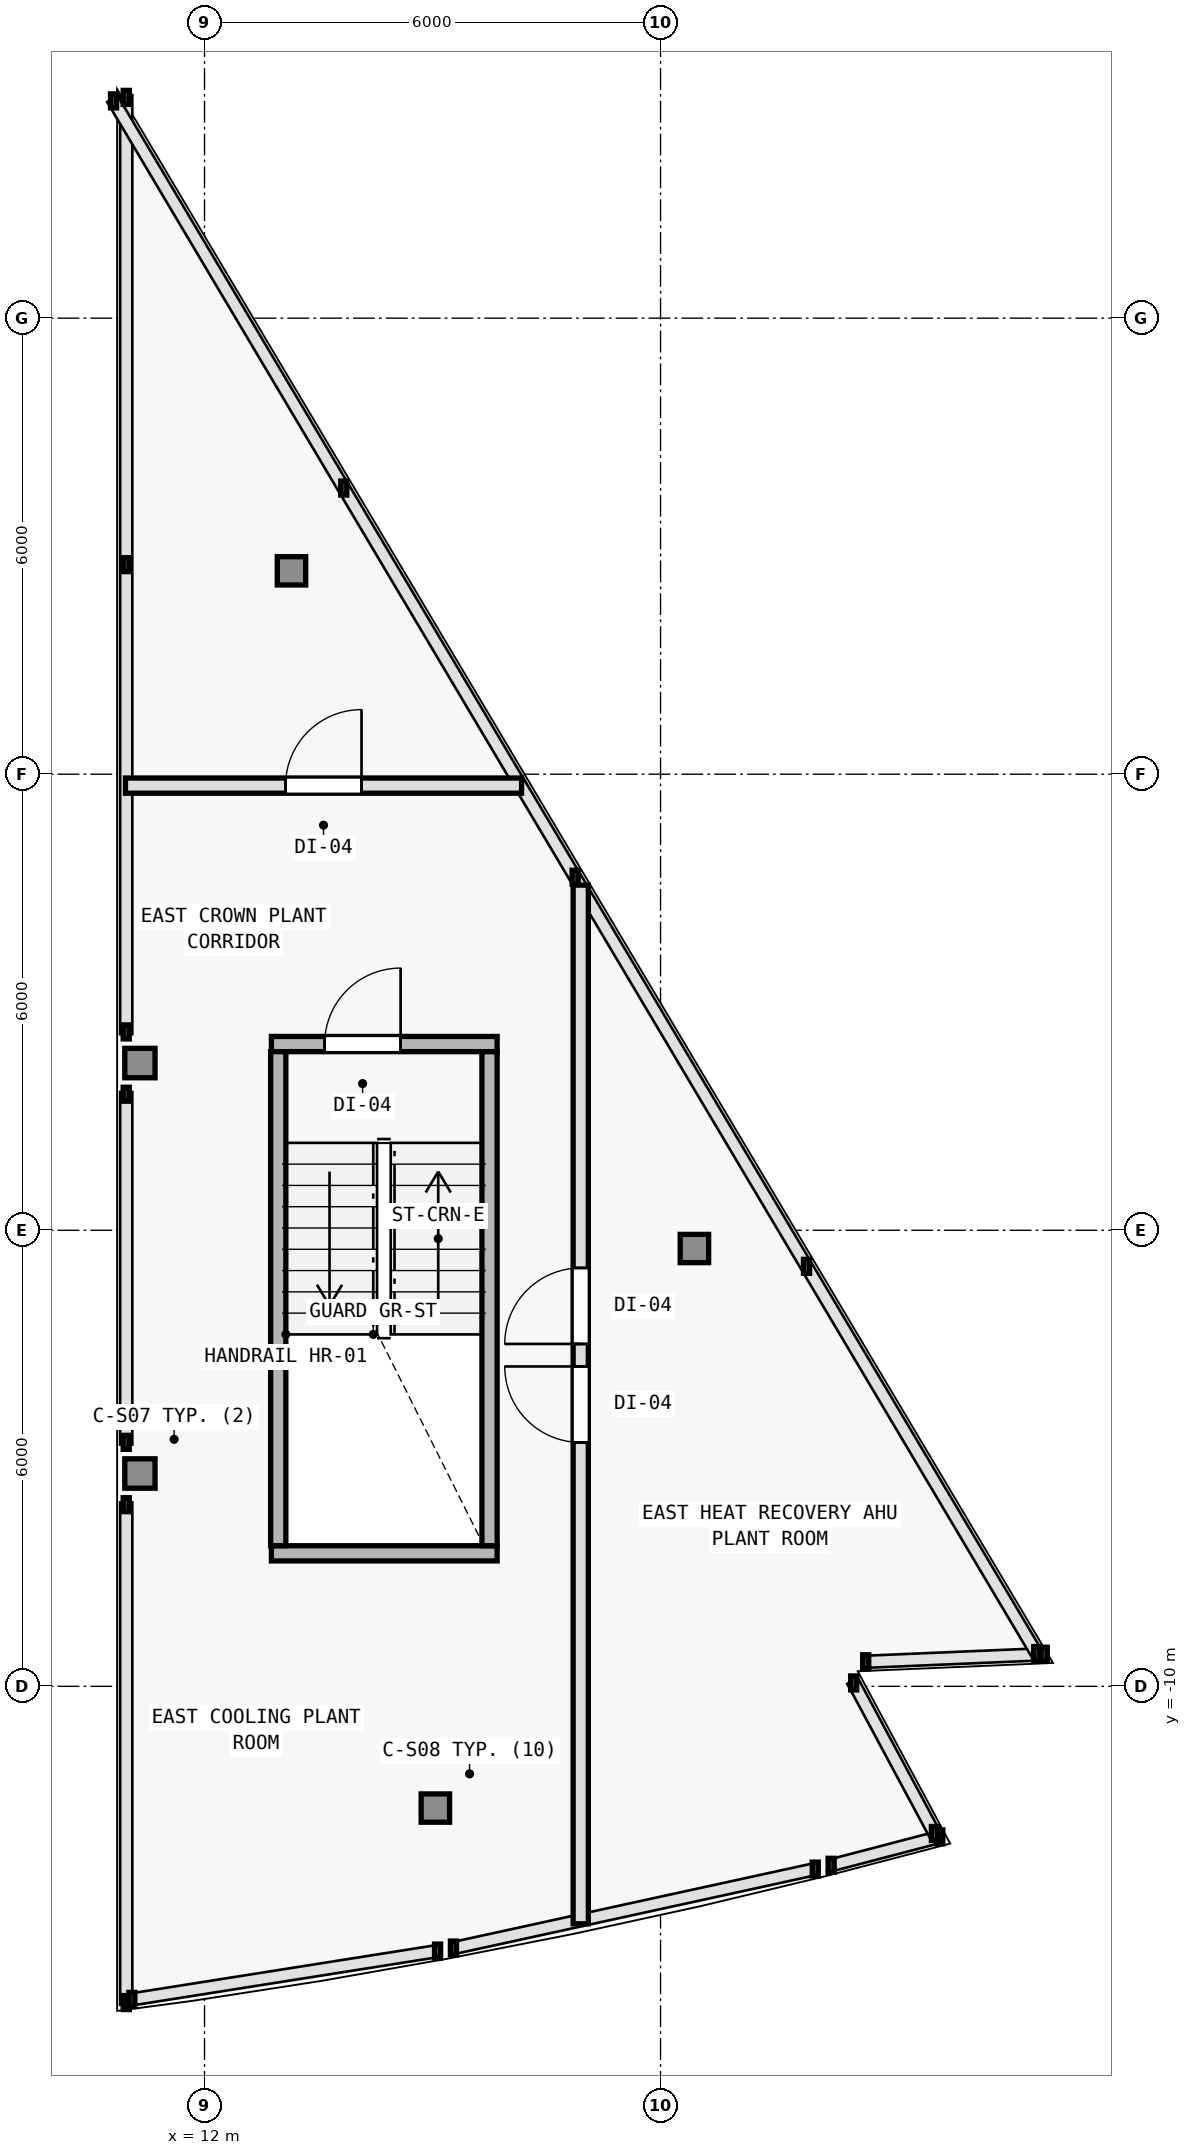
"""IFC4 building model, lengths in metres.
Left out: names, types, materials, properties, quantities, classifications, styles, units other than length and angle.
Written with IfcOpenShell. Run it as: python <this file> out.ifc"""

import sys

from ifc_helpers import new_model, si_unit, direction, frame, frame_2d, origin, origin_2d, place, context, subcontext, project, spatial, rectangle, i_section, extrude, element, fill, save


model = new_model("IFC4")
c1 = context("Model", 3, precision=1e-05, world=origin(), true_north=direction((0.0, 1.0)))
c2 = subcontext(c1, "Body", "Model", "MODEL_VIEW")
j1 = project(units=[si_unit("LENGTHUNIT", "METRE"), si_unit("PLANEANGLEUNIT", "RADIAN")], contexts=[c1])
p1 = place(None, origin())
s1 = spatial("IfcSite", under=j1, at=p1, CompositionType="ELEMENT")
p2 = place(p1, origin())
s2 = spatial("IfcBuilding", under=s1, at=p2, CompositionType="ELEMENT")
p3 = place(p2, frame((0.0, 0.0, 308.4)))
s3 = spatial("IfcBuildingStorey", under=s2, at=p3, CompositionType="ELEMENT", Elevation=308.4)
for number, where, z_axis, x_axis in (
    (1, (11.15, -7.2, 0.0), (0.0, 0.0, 1.0), (1.0, 0.0, 0.0)),
    (2, (11.15, -1.8, 0.0), (0.0, 0.0, 1.0), (1.0, 0.0, 0.0)),
):
    element("IfcColumn", number, at=place(p3, frame(where, z_axis=z_axis, x_axis=x_axis)), inside=s3, PredefinedType="COLUMN", context=c2, shape_type="SweptSolid", body=[
        extrude(i_section(OverallWidth=0.398, OverallDepth=0.387, WebThickness=0.013, FlangeThickness=0.022, FilletRadius=0.015, at=origin_2d()), origin(), (0.0, 0.0, 1.0), 3.6),
    ])
for number, where, z_axis, x_axis in (
    (3, (15.037, -11.602, 0.0), (0.0, 0.0, 1.0), (1.0, 0.0, 0.0)),
    (4, (18.446, -4.24, 0.0), (0.0, 0.0, 1.0), (1.0, 0.0, 0.0)),
    (5, (13.144, 4.676, 0.0), (0.0, 0.0, 1.0), (1.0, 0.0, 0.0)),
):
    element("IfcColumn", number, at=place(p3, frame(where, z_axis=z_axis, x_axis=x_axis)), inside=s3, PredefinedType="COLUMN", context=c2, shape_type="SweptSolid", body=[
        extrude(i_section(OverallWidth=0.374, OverallDepth=0.372, WebThickness=0.012, FlangeThickness=0.02, FilletRadius=0.015, at=origin_2d()), origin(), (0.0, 0.0, 1.0), 3.6),
    ])
p4 = place(p3, frame((12.88, -8.25, 0.0), z_axis=(0.0, 0.0, 1.0), x_axis=(1.0, 0.0, 0.0)))
e6 = element("IfcWall", 6, at=p4, inside=s3, PredefinedType="SOLIDWALL", context=c2, shape_type="SweptSolid", body=[
    extrude(rectangle(XDim=2.97, YDim=0.2, at=frame_2d((1.485, 0.0))), origin(), (0.0, 0.0, 1.0), 3.34),
])
p5 = place(p3, frame((12.88, -1.55, 0.0), z_axis=(0.0, 0.0, 1.0), x_axis=(1.0, 0.0, 0.0)))
e7 = element("IfcWall", 7, at=p5, inside=s3, PredefinedType="SOLIDWALL", context=c2, shape_type="SweptSolid", body=[
    extrude(rectangle(XDim=2.97, YDim=0.2, at=frame_2d((1.485, 0.0))), origin(), (0.0, 0.0, 1.0), 3.34),
])
p6 = place(p5, frame((0.7, 0.0, 0.0)))
e8 = element("IfcOpeningElement", 8, at=p6, cuts=e7, PredefinedType="OPENING", context=c2, shape_type="SweptSolid", body=[
    extrude(rectangle(XDim=1.0, YDim=2.15, at=frame_2d((0.5, 1.075))), frame((0.0, 0.11, 0.0), z_axis=(0.0, -1.0, 0.0), x_axis=(1.0, 0.0, 0.0)), (0.0, 0.0, 1.0), 0.22),
])
for number, where, z_axis, x_axis in (
    (9, (12.97, -8.15, 0.0), (0.0, 0.0, 1.0), (0.0, 1.0, 0.0)),
    (10, (15.75, -8.15, 0.0), (0.0, 0.0, 1.0), (0.0, 1.0, 0.0)),
):
    element("IfcWall", number, at=place(p3, frame(where, z_axis=z_axis, x_axis=x_axis)), inside=s3, PredefinedType="SOLIDWALL", context=c2, shape_type="SweptSolid", body=[
        extrude(rectangle(XDim=6.5, YDim=0.2, at=frame_2d((3.25, 0.0))), origin(), (0.0, 0.0, 1.0), 3.34),
    ])
p7 = place(p3, frame((16.95, -13.124, 0.0), z_axis=(0.0, 0.0, 1.0), x_axis=(0.0, 1.0, 0.0)))
e11 = element("IfcWall", 11, at=p7, inside=s3, PredefinedType="SOLIDWALL", context=c2, shape_type="SweptSolid", body=[
    extrude(rectangle(XDim=13.665, YDim=0.2, at=frame_2d((6.833, 0.0))), origin(), (0.0, 0.0, 1.0), 2.865),
])
p8 = place(p7, frame((6.332, 0.0, 0.0)))
e12 = element("IfcOpeningElement", 12, at=p8, cuts=e11, PredefinedType="OPENING", context=c2, shape_type="SweptSolid", body=[
    extrude(rectangle(XDim=1.0, YDim=2.15, at=frame_2d((0.5, 1.075))), frame((0.0, 0.11, 0.0), z_axis=(0.0, -1.0, 0.0), x_axis=(1.0, 0.0, 0.0)), (0.0, 0.0, 1.0), 0.22),
])
p9 = place(p7, frame((7.628, 0.0, 0.0)))
e13 = element("IfcOpeningElement", 13, at=p9, cuts=e11, PredefinedType="OPENING", context=c2, shape_type="SweptSolid", body=[
    extrude(rectangle(XDim=1.0, YDim=2.15, at=frame_2d((0.5, 1.075))), frame((0.0, 0.11, 0.0), z_axis=(0.0, -1.0, 0.0), x_axis=(1.0, 0.0, 0.0)), (0.0, 0.0, 1.0), 0.22),
])
p10 = place(p3, frame((10.96, 1.85, 0.0), z_axis=(0.0, 0.0, 1.0), x_axis=(1.0, 0.0, 0.0)))
e14 = element("IfcWall", 14, at=p10, inside=s3, PredefinedType="SOLIDWALL", context=c2, shape_type="SweptSolid", body=[
    extrude(rectangle(XDim=5.212, YDim=0.2, at=frame_2d((2.606, 0.0))), origin(), (0.0, 0.0, 1.0), 2.865),
])
p11 = place(p10, frame((2.106, 0.0, 0.0)))
e15 = element("IfcOpeningElement", 15, at=p11, cuts=e14, PredefinedType="OPENING", context=c2, shape_type="SweptSolid", body=[
    extrude(rectangle(XDim=1.0, YDim=2.15, at=frame_2d((0.5, 1.075))), frame((0.0, 0.11, 0.0), z_axis=(0.0, -1.0, 0.0), x_axis=(1.0, 0.0, 0.0)), (0.0, 0.0, 1.0), 0.22),
])
p12 = place(p6, origin())
e16 = element("IfcDoor", 16, at=p12, inside=s3, OperationType="SINGLE_SWING_RIGHT", PredefinedType="DOOR", context=c2, shape_type="SweptSolid", body=[
    extrude(rectangle(XDim=1.0, YDim=2.15, at=frame_2d((0.5, 1.075))), frame((0.0, 0.025, 0.0), z_axis=(0.0, -1.0, 0.0), x_axis=(1.0, 0.0, 0.0)), (0.0, 0.0, 1.0), 0.05),
])
fill(e8, e16)
p13 = place(p8, origin())
e17 = element("IfcDoor", 17, at=p13, inside=s3, OperationType="SINGLE_SWING_RIGHT", PredefinedType="DOOR", context=c2, shape_type="SweptSolid", body=[
    extrude(rectangle(XDim=1.0, YDim=2.15, at=frame_2d((0.5, 1.075))), frame((0.0, 0.025, 0.0), z_axis=(0.0, -1.0, 0.0), x_axis=(1.0, 0.0, 0.0)), (0.0, 0.0, 1.0), 0.05),
])
fill(e12, e17)
p14 = place(p9, origin())
e18 = element("IfcDoor", 18, at=p14, inside=s3, OperationType="SINGLE_SWING_LEFT", PredefinedType="DOOR", context=c2, shape_type="SweptSolid", body=[
    extrude(rectangle(XDim=1.0, YDim=2.15, at=frame_2d((0.5, 1.075))), frame((0.0, 0.025, 0.0), z_axis=(0.0, -1.0, 0.0), x_axis=(1.0, 0.0, 0.0)), (0.0, 0.0, 1.0), 0.05),
])
fill(e13, e18)
p15 = place(p11, origin())
e19 = element("IfcDoor", 19, at=p15, inside=s3, OperationType="SINGLE_SWING_RIGHT", PredefinedType="DOOR", context=c2, shape_type="SweptSolid", body=[
    extrude(rectangle(XDim=1.0, YDim=2.15, at=frame_2d((0.5, 1.075))), frame((0.0, 0.025, 0.0), z_axis=(0.0, -1.0, 0.0), x_axis=(1.0, 0.0, 0.0)), (0.0, 0.0, 1.0), 0.05),
])
fill(e15, e19)
save(model, sys.argv[1])
